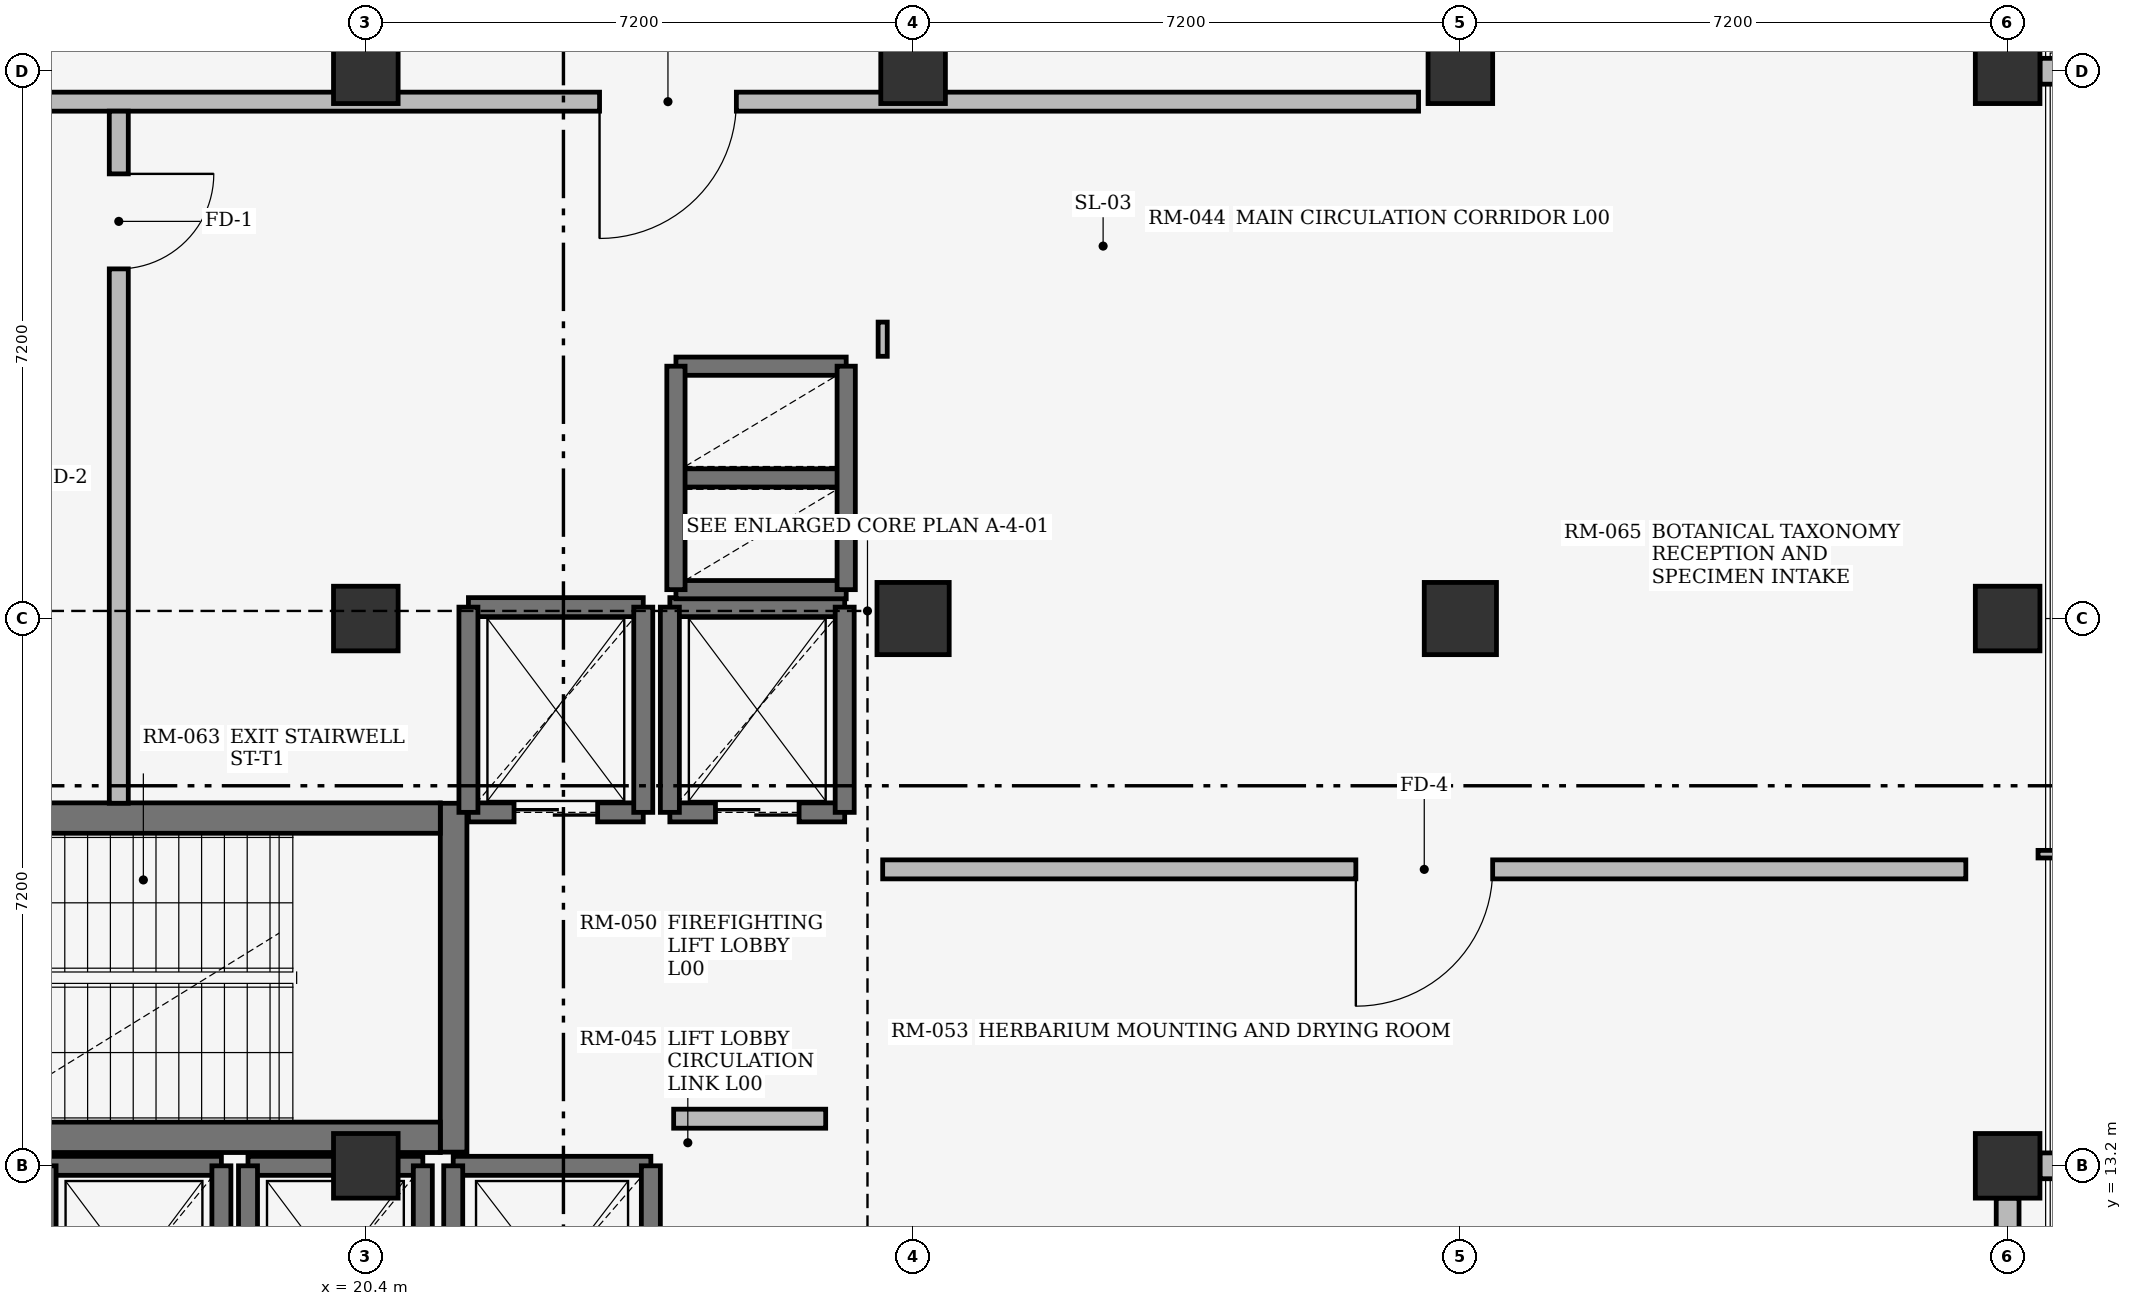
"""IFC4 building model, lengths in metres.
Left out: names, types, materials, properties, quantities, classifications, styles, units other than length and angle.
Written with IfcOpenShell. Run it as: python <this file> out.ifc"""

import sys

from ifc_helpers import new_model, si_unit, direction, frame, frame_2d, origin, origin_2d, place, context, subcontext, project, spatial, rectangle, extrude, element, fill, save


model = new_model("IFC4")
c1 = context("Model", 3, precision=1e-05, world=origin(), true_north=direction((0.0, 1.0)))
c2 = subcontext(c1, "Body", "Model", "MODEL_VIEW")
j1 = project(units=[si_unit("LENGTHUNIT", "METRE"), si_unit("PLANEANGLEUNIT", "RADIAN")], contexts=[c1])
p1 = place(None, origin())
s1 = spatial("IfcSite", under=j1, at=p1, CompositionType="ELEMENT")
p2 = place(p1, origin())
s2 = spatial("IfcBuilding", under=s1, at=p2, CompositionType="ELEMENT")
p3 = place(p2, origin())
s3 = spatial("IfcBuildingStorey", under=s2, at=p3, CompositionType="ELEMENT", Elevation=0.0)
for number, where, z_axis, x_axis in (
    (1, (20.4, 13.2, 0.0), (0.0, 0.0, 1.0), (1.0, 0.0, 0.0)),
    (2, (20.4, 20.4, 0.0), (0.0, 0.0, 1.0), (1.0, 0.0, 0.0)),
    (3, (20.4, 27.6, 0.0), (0.0, 0.0, 1.0), (1.0, 0.0, 0.0)),
):
    element("IfcColumn", number, at=place(p3, frame(where, z_axis=z_axis, x_axis=x_axis)), inside=s3, PredefinedType="COLUMN", context=c2, shape_type="SweptSolid", body=[
        extrude(rectangle(XDim=0.85, YDim=0.85, at=origin_2d()), origin(), (0.0, 0.0, 1.0), 4.48),
    ])
p4 = place(p3, frame((27.6, 20.4, 0.0), z_axis=(0.0, 0.0, 1.0), x_axis=(1.0, 0.0, 0.0)))
e4 = element("IfcColumn", 4, at=p4, inside=s3, PredefinedType="COLUMN", context=c2, shape_type="SweptSolid", body=[
    extrude(rectangle(XDim=0.95, YDim=0.95, at=origin_2d()), origin(), (0.0, 0.0, 1.0), 4.48),
])
p5 = place(p3, frame((27.6, 27.6, 0.0), z_axis=(0.0, 0.0, 1.0), x_axis=(1.0, 0.0, 0.0)))
e5 = element("IfcColumn", 5, at=p5, inside=s3, PredefinedType="COLUMN", context=c2, shape_type="SweptSolid", body=[
    extrude(rectangle(XDim=0.85, YDim=0.85, at=origin_2d()), origin(), (0.0, 0.0, 1.0), 4.48),
])
p6 = place(p3, frame((34.8, 20.4, 0.0), z_axis=(0.0, 0.0, 1.0), x_axis=(1.0, 0.0, 0.0)))
e6 = element("IfcColumn", 6, at=p6, inside=s3, PredefinedType="COLUMN", context=c2, shape_type="SweptSolid", body=[
    extrude(rectangle(XDim=0.95, YDim=0.95, at=origin_2d()), origin(), (0.0, 0.0, 1.0), 4.48),
])
for number, where, z_axis, x_axis in (
    (7, (34.8, 27.6, 0.0), (0.0, 0.0, 1.0), (1.0, 0.0, 0.0)),
    (8, (42.0, 13.2, 0.0), (0.0, 0.0, 1.0), (1.0, 0.0, 0.0)),
    (9, (42.0, 20.4, 0.0), (0.0, 0.0, 1.0), (1.0, 0.0, 0.0)),
    (10, (42.0, 27.6, 0.0), (0.0, 0.0, 1.0), (1.0, 0.0, 0.0)),
):
    element("IfcColumn", number, at=place(p3, frame(where, z_axis=z_axis, x_axis=x_axis)), inside=s3, PredefinedType="COLUMN", context=c2, shape_type="SweptSolid", body=[
        extrude(rectangle(XDim=0.85, YDim=0.85, at=origin_2d()), origin(), (0.0, 0.0, 1.0), 4.48),
    ])
p7 = place(p3, frame((42.425, 13.2, 0.0), z_axis=(0.0, 0.0, 1.0), x_axis=(1.0, 0.0, 0.0)))
e11 = element("IfcWall", 11, at=p7, inside=s3, PredefinedType="STANDARD", context=c2, shape_type="SweptSolid", body=[
    extrude(rectangle(XDim=6.4, YDim=0.34, at=frame_2d((3.2, 0.0))), origin(), (0.0, 0.0, 1.0), 3.97),
])
p8 = place(p7, frame((2.1, 0.0, 0.0)))
e12 = element("IfcOpeningElement", 12, at=p8, cuts=e11, PredefinedType="OPENING", context=c2, shape_type="SweptSolid", body=[
    extrude(rectangle(XDim=2.2, YDim=2.4, at=frame_2d((1.1, 1.2))), frame((0.0, 0.18, 0.0), z_axis=(0.0, -1.0, 0.0), x_axis=(1.0, 0.0, 0.0)), (0.0, 0.0, 1.0), 0.36),
])
p9 = place(p3, frame((42.425, 27.6, 0.0), z_axis=(0.0, 0.0, 1.0), x_axis=(1.0, 0.0, 0.0)))
e13 = element("IfcWall", 13, at=p9, inside=s3, PredefinedType="STANDARD", context=c2, shape_type="SweptSolid", body=[
    extrude(rectangle(XDim=6.4, YDim=0.34, at=frame_2d((3.2, 0.0))), origin(), (0.0, 0.0, 1.0), 3.97),
])
p10 = place(p9, frame((2.4, 0.0, 0.75)))
e14 = element("IfcOpeningElement", 14, at=p10, cuts=e13, PredefinedType="OPENING", context=c2, shape_type="SweptSolid", body=[
    extrude(rectangle(XDim=1.6, YDim=1.35, at=frame_2d((0.8, 0.675))), frame((0.0, 0.18, 0.0), z_axis=(0.0, -1.0, 0.0), x_axis=(1.0, 0.0, 0.0)), (0.0, 0.0, 1.0), 0.36),
])
p11 = place(p3, frame((42.0, 6.425, 0.0), z_axis=(0.0, 0.0, 1.0), x_axis=(0.0, 1.0, 0.0)))
e15 = element("IfcWall", 15, at=p11, inside=s3, PredefinedType="STANDARD", context=c2, shape_type="SweptSolid", body=[
    extrude(rectangle(XDim=6.35, YDim=0.3, at=frame_2d((3.175, 0.0))), origin(), (0.0, 0.0, 1.0), 3.66),
])
p12 = place(p11, frame((2.6, 0.0, 0.75)))
e16 = element("IfcOpeningElement", 16, at=p12, cuts=e15, PredefinedType="OPENING", context=c2, shape_type="SweptSolid", body=[
    extrude(rectangle(XDim=1.15, YDim=1.5, at=frame_2d((0.575, 0.75))), frame((0.0, 0.16, 0.0), z_axis=(0.0, -1.0, 0.0), x_axis=(1.0, 0.0, 0.0)), (0.0, 0.0, 1.0), 0.32),
])
p13 = place(p3, frame((21.555, 13.38, 0.0), z_axis=(0.0, 0.0, 1.0), x_axis=(0.0, 1.0, 0.0)))
e17 = element("IfcWall", 17, at=p13, inside=s3, PredefinedType="SHEAR", context=c2, shape_type="SweptSolid", body=[
    extrude(rectangle(XDim=4.59, YDim=0.35, at=frame_2d((2.295, 0.0))), origin(), (0.0, 0.0, 1.0), 4.48),
])
for number, where, z_axis, x_axis in (
    (18, (13.4, 13.575, 0.0), (0.0, 0.0, 1.0), (1.0, 0.0, 0.0)),
    (19, (13.4, 17.775, 0.0), (0.0, 0.0, 1.0), (1.0, 0.0, 0.0)),
):
    element("IfcWall", number, at=place(p3, frame(where, z_axis=z_axis, x_axis=x_axis)), inside=s3, PredefinedType="SHEAR", context=c2, shape_type="SweptSolid", body=[
        extrude(rectangle(XDim=7.98, YDim=0.4, at=frame_2d((3.99, 0.0))), origin(), (0.0, 0.0, 1.0), 4.48),
    ])
p14 = place(p3, frame((21.75, 17.85, 0.0), z_axis=(0.0, 0.0, 1.0), x_axis=(1.0, 0.0, 0.0)))
e20 = element("IfcWall", 20, at=p14, inside=s3, PredefinedType="SHEAR", context=c2, shape_type="SweptSolid", body=[
    extrude(rectangle(XDim=2.3, YDim=0.25, at=frame_2d((1.15, 0.0))), origin(), (0.0, 0.0, 1.0), 4.48),
])
p15 = place(p14, frame((0.6, 0.0, 0.0)))
e21 = element("IfcOpeningElement", 21, at=p15, cuts=e20, PredefinedType="OPENING", context=c2, shape_type="SweptSolid", body=[
    extrude(rectangle(XDim=1.1, YDim=2.2, at=frame_2d((0.55, 1.1))), frame((0.0, 0.135, 0.0), z_axis=(0.0, -1.0, 0.0), x_axis=(1.0, 0.0, 0.0)), (0.0, 0.0, 1.0), 0.27),
])
p16 = place(p3, frame((21.75, 20.55, 0.0), z_axis=(0.0, 0.0, 1.0), x_axis=(1.0, 0.0, 0.0)))
e22 = element("IfcWall", 22, at=p16, inside=s3, PredefinedType="SHEAR", context=c2, shape_type="SweptSolid", body=[
    extrude(rectangle(XDim=2.3, YDim=0.25, at=frame_2d((1.15, 0.0))), origin(), (0.0, 0.0, 1.0), 4.48),
])
for number, where, z_axis, x_axis in (
    (23, (21.75, 17.85, 0.0), (0.0, 0.0, 1.0), (0.0, 1.0, 0.0)),
    (24, (24.05, 17.85, 0.0), (0.0, 0.0, 1.0), (0.0, 1.0, 0.0)),
):
    element("IfcWall", number, at=place(p3, frame(where, z_axis=z_axis, x_axis=x_axis)), inside=s3, PredefinedType="SHEAR", context=c2, shape_type="SweptSolid", body=[
        extrude(rectangle(XDim=2.7, YDim=0.25, at=frame_2d((1.35, 0.0))), origin(), (0.0, 0.0, 1.0), 4.48),
    ])
p17 = place(p3, frame((24.4, 17.85, 0.0), z_axis=(0.0, 0.0, 1.0), x_axis=(1.0, 0.0, 0.0)))
e25 = element("IfcWall", 25, at=p17, inside=s3, PredefinedType="SHEAR", context=c2, shape_type="SweptSolid", body=[
    extrude(rectangle(XDim=2.3, YDim=0.25, at=frame_2d((1.15, 0.0))), origin(), (0.0, 0.0, 1.0), 4.48),
])
p18 = place(p17, frame((0.6, 0.0, 0.0)))
e26 = element("IfcOpeningElement", 26, at=p18, cuts=e25, PredefinedType="OPENING", context=c2, shape_type="SweptSolid", body=[
    extrude(rectangle(XDim=1.1, YDim=2.2, at=frame_2d((0.55, 1.1))), frame((0.0, 0.135, 0.0), z_axis=(0.0, -1.0, 0.0), x_axis=(1.0, 0.0, 0.0)), (0.0, 0.0, 1.0), 0.27),
])
p19 = place(p3, frame((24.4, 20.55, 0.0), z_axis=(0.0, 0.0, 1.0), x_axis=(1.0, 0.0, 0.0)))
e27 = element("IfcWall", 27, at=p19, inside=s3, PredefinedType="SHEAR", context=c2, shape_type="SweptSolid", body=[
    extrude(rectangle(XDim=2.3, YDim=0.25, at=frame_2d((1.15, 0.0))), origin(), (0.0, 0.0, 1.0), 4.48),
])
for number, where, z_axis, x_axis in (
    (28, (24.4, 17.85, 0.0), (0.0, 0.0, 1.0), (0.0, 1.0, 0.0)),
    (29, (26.7, 17.85, 0.0), (0.0, 0.0, 1.0), (0.0, 1.0, 0.0)),
):
    element("IfcWall", number, at=place(p3, frame(where, z_axis=z_axis, x_axis=x_axis)), inside=s3, PredefinedType="SHEAR", context=c2, shape_type="SweptSolid", body=[
        extrude(rectangle(XDim=2.7, YDim=0.25, at=frame_2d((1.35, 0.0))), origin(), (0.0, 0.0, 1.0), 4.48),
    ])
p20 = place(p3, frame((16.2, 13.2, 0.0), z_axis=(0.0, 0.0, 1.0), x_axis=(1.0, 0.0, 0.0)))
e30 = element("IfcWall", 30, at=p20, inside=s3, PredefinedType="SHEAR", context=c2, shape_type="SweptSolid", body=[
    extrude(rectangle(XDim=2.3, YDim=0.25, at=frame_2d((1.15, 0.0))), origin(), (0.0, 0.0, 1.0), 4.48),
])
for number, where, z_axis, x_axis in (
    (31, (16.2, 10.4, 0.0), (0.0, 0.0, 1.0), (0.0, 1.0, 0.0)),
    (32, (18.5, 10.4, 0.0), (0.0, 0.0, 1.0), (0.0, 1.0, 0.0)),
):
    element("IfcWall", number, at=place(p3, frame(where, z_axis=z_axis, x_axis=x_axis)), inside=s3, PredefinedType="SHEAR", context=c2, shape_type="SweptSolid", body=[
        extrude(rectangle(XDim=2.8, YDim=0.25, at=frame_2d((1.4, 0.0))), origin(), (0.0, 0.0, 1.0), 4.48),
    ])
p21 = place(p3, frame((18.85, 13.2, 0.0), z_axis=(0.0, 0.0, 1.0), x_axis=(1.0, 0.0, 0.0)))
e33 = element("IfcWall", 33, at=p21, inside=s3, PredefinedType="SHEAR", context=c2, shape_type="SweptSolid", body=[
    extrude(rectangle(XDim=2.3, YDim=0.25, at=frame_2d((1.15, 0.0))), origin(), (0.0, 0.0, 1.0), 4.48),
])
for number, where, z_axis, x_axis in (
    (34, (18.85, 10.4, 0.0), (0.0, 0.0, 1.0), (0.0, 1.0, 0.0)),
    (35, (21.15, 10.4, 0.0), (0.0, 0.0, 1.0), (0.0, 1.0, 0.0)),
):
    element("IfcWall", number, at=place(p3, frame(where, z_axis=z_axis, x_axis=x_axis)), inside=s3, PredefinedType="SHEAR", context=c2, shape_type="SweptSolid", body=[
        extrude(rectangle(XDim=2.8, YDim=0.25, at=frame_2d((1.4, 0.0))), origin(), (0.0, 0.0, 1.0), 4.48),
    ])
p22 = place(p3, frame((21.55, 13.2, 0.0), z_axis=(0.0, 0.0, 1.0), x_axis=(1.0, 0.0, 0.0)))
e36 = element("IfcWall", 36, at=p22, inside=s3, PredefinedType="SHEAR", context=c2, shape_type="SweptSolid", body=[
    extrude(rectangle(XDim=2.6, YDim=0.25, at=frame_2d((1.3, 0.0))), origin(), (0.0, 0.0, 1.0), 4.48),
])
for number, where, z_axis, x_axis in (
    (37, (21.55, 10.2, 0.0), (0.0, 0.0, 1.0), (0.0, 1.0, 0.0)),
    (38, (24.15, 10.2, 0.0), (0.0, 0.0, 1.0), (0.0, 1.0, 0.0)),
):
    element("IfcWall", number, at=place(p3, frame(where, z_axis=z_axis, x_axis=x_axis)), inside=s3, PredefinedType="SHEAR", context=c2, shape_type="SweptSolid", body=[
        extrude(rectangle(XDim=3.0, YDim=0.25, at=frame_2d((1.5, 0.0))), origin(), (0.0, 0.0, 1.0), 4.48),
    ])
for number, where, z_axis, x_axis in (
    (39, (24.48, 20.78, 0.0), (0.0, 0.0, 1.0), (1.0, 0.0, 0.0)),
    (40, (24.48, 22.25, 0.0), (0.0, 0.0, 1.0), (1.0, 0.0, 0.0)),
    (41, (24.48, 23.72, 0.0), (0.0, 0.0, 1.0), (1.0, 0.0, 0.0)),
):
    element("IfcWall", number, at=place(p3, frame(where, z_axis=z_axis, x_axis=x_axis)), inside=s3, PredefinedType="SHEAR", context=c2, shape_type="SweptSolid", body=[
        extrude(rectangle(XDim=2.24, YDim=0.24, at=frame_2d((1.12, 0.0))), origin(), (0.0, 0.0, 1.0), 4.48),
    ])
for number, where, z_axis, x_axis in (
    (42, (24.48, 20.78, 0.0), (0.0, 0.0, 1.0), (0.0, 1.0, 0.0)),
    (43, (26.72, 20.78, 0.0), (0.0, 0.0, 1.0), (0.0, 1.0, 0.0)),
):
    element("IfcWall", number, at=place(p3, frame(where, z_axis=z_axis, x_axis=x_axis)), inside=s3, PredefinedType="SHEAR", context=c2, shape_type="SweptSolid", body=[
        extrude(rectangle(XDim=2.94, YDim=0.24, at=frame_2d((1.47, 0.0))), origin(), (0.0, 0.0, 1.0), 4.48),
    ])
p23 = place(p3, frame((24.45, 13.82, 0.0), z_axis=(0.0, 0.0, 1.0), x_axis=(1.0, 0.0, 0.0)))
e44 = element("IfcWall", 44, at=p23, inside=s3, PredefinedType="SOLIDWALL", context=c2, shape_type="SweptSolid", body=[
    extrude(rectangle(XDim=2.0, YDim=0.25, at=frame_2d((1.0, 0.0))), origin(), (0.0, 0.0, 1.0), 4.46),
])
p24 = place(p3, frame((27.2, 24.3, 0.0), z_axis=(0.0, 0.0, 1.0), x_axis=(0.0, -1.0, 0.0)))
e45 = element("IfcWall", 45, at=p24, inside=s3, PredefinedType="PARTITIONING", context=c2, shape_type="SweptSolid", body=[
    extrude(rectangle(XDim=0.45, YDim=0.12, at=frame_2d((0.225, 0.0))), origin(), (0.0, 0.0, 1.0), 3.46),
])
p25 = place(p3, frame((14.5, 27.2, 0.0), z_axis=(0.0, 0.0, 1.0), x_axis=(1.0, 0.0, 0.0)))
e46 = element("IfcWall", 46, at=p25, inside=s3, PredefinedType="SOLIDWALL", context=c2, shape_type="SweptSolid", body=[
    extrude(rectangle(XDim=19.75, YDim=0.25, at=frame_2d((9.875, 0.0))), origin(), (0.0, 0.0, 1.0), 4.46),
])
p26 = place(p25, frame((8.975, 0.0, 0.0)))
e47 = element("IfcOpeningElement", 47, at=p26, cuts=e46, PredefinedType="OPENING", context=c2, shape_type="SweptSolid", body=[
    extrude(rectangle(XDim=1.8, YDim=2.25, at=frame_2d((0.9, 1.125))), frame((0.0, 0.135, 0.0), z_axis=(0.0, -1.0, 0.0), x_axis=(1.0, 0.0, 0.0)), (0.0, 0.0, 1.0), 0.27),
])
p27 = place(p3, frame((42.4, 17.3, 0.0), z_axis=(0.0, 0.0, 1.0), x_axis=(1.0, 0.0, 0.0)))
e48 = element("IfcWall", 48, at=p27, inside=s3, PredefinedType="PARTITIONING", context=c2, shape_type="SweptSolid", body=[
    extrude(rectangle(XDim=6.6, YDim=0.1, at=frame_2d((3.3, 0.0))), origin(), (0.0, 0.0, 1.0), 4.46),
])
p28 = place(p27, frame((2.825, 0.0, 0.0)))
e49 = element("IfcOpeningElement", 49, at=p28, cuts=e48, PredefinedType="OPENING", context=c2, shape_type="SweptSolid", body=[
    extrude(rectangle(XDim=0.95, YDim=2.15, at=frame_2d((0.475, 1.075))), frame((0.0, 0.06, 0.0), z_axis=(0.0, -1.0, 0.0), x_axis=(1.0, 0.0, 0.0)), (0.0, 0.0, 1.0), 0.12),
])
p29 = place(p3, frame((27.2, 17.1, 0.0), z_axis=(0.0, 0.0, 1.0), x_axis=(1.0, 0.0, 0.0)))
e50 = element("IfcWall", 50, at=p29, inside=s3, PredefinedType="SOLIDWALL", context=c2, shape_type="SweptSolid", body=[
    extrude(rectangle(XDim=14.25, YDim=0.25, at=frame_2d((7.125, 0.0))), origin(), (0.0, 0.0, 1.0), 4.46),
])
p30 = place(p29, frame((6.225, 0.0, 0.0)))
e51 = element("IfcOpeningElement", 51, at=p30, cuts=e50, PredefinedType="OPENING", context=c2, shape_type="SweptSolid", body=[
    extrude(rectangle(XDim=1.8, YDim=2.25, at=frame_2d((0.9, 1.125))), frame((0.0, 0.135, 0.0), z_axis=(0.0, -1.0, 0.0), x_axis=(1.0, 0.0, 0.0)), (0.0, 0.0, 1.0), 0.27),
])
p31 = place(p3, frame((17.15, 17.97, 0.0), z_axis=(0.0, 0.0, 1.0), x_axis=(0.0, 1.0, 0.0)))
e52 = element("IfcWall", 52, at=p31, inside=s3, PredefinedType="SOLIDWALL", context=c2, shape_type="SweptSolid", body=[
    extrude(rectangle(XDim=9.105, YDim=0.25, at=frame_2d((4.552, 0.0))), origin(), (0.0, 0.0, 1.0), 4.46),
])
p32 = place(p31, frame((7.03, 0.0, 0.0)))
e53 = element("IfcOpeningElement", 53, at=p32, cuts=e52, PredefinedType="OPENING", context=c2, shape_type="SweptSolid", body=[
    extrude(rectangle(XDim=1.25, YDim=2.2, at=frame_2d((0.625, 1.1))), frame((0.0, 0.135, 0.0), z_axis=(0.0, -1.0, 0.0), x_axis=(1.0, 0.0, 0.0)), (0.0, 0.0, 1.0), 0.27),
])
p33 = place(p15, origin())
e54 = element("IfcDoor", 54, at=p33, inside=s3, OperationType="DOUBLE_DOOR_SLIDING", PredefinedType="DOOR", context=c2, shape_type="SweptSolid", body=[
    extrude(rectangle(XDim=1.1, YDim=2.2, at=frame_2d((0.55, 1.1))), frame((0.0, 0.025, 0.0), z_axis=(0.0, -1.0, 0.0), x_axis=(1.0, 0.0, 0.0)), (0.0, 0.0, 1.0), 0.05),
])
fill(e21, e54)
p34 = place(p18, origin())
e55 = element("IfcDoor", 55, at=p34, inside=s3, OperationType="DOUBLE_DOOR_SLIDING", PredefinedType="DOOR", context=c2, shape_type="SweptSolid", body=[
    extrude(rectangle(XDim=1.1, YDim=2.2, at=frame_2d((0.55, 1.1))), frame((0.0, 0.025, 0.0), z_axis=(0.0, -1.0, 0.0), x_axis=(1.0, 0.0, 0.0)), (0.0, 0.0, 1.0), 0.05),
])
fill(e26, e55)
p35 = place(p26, frame((1.8, 0.0, 0.0), z_axis=(0.0, 0.0, 1.0), x_axis=(-1.0, 0.0, 0.0)))
e56 = element("IfcDoor", 56, at=p35, inside=s3, OperationType="DOUBLE_DOOR_SINGLE_SWING", PredefinedType="DOOR", context=c2, shape_type="SweptSolid", body=[
    extrude(rectangle(XDim=1.8, YDim=2.25, at=frame_2d((0.9, 1.125))), frame((0.0, 0.025, 0.0), z_axis=(0.0, -1.0, 0.0), x_axis=(1.0, 0.0, 0.0)), (0.0, 0.0, 1.0), 0.05),
])
fill(e47, e56)
p36 = place(p30, frame((1.8, 0.0, 0.0), z_axis=(0.0, 0.0, 1.0), x_axis=(-1.0, 0.0, 0.0)))
e57 = element("IfcDoor", 57, at=p36, inside=s3, OperationType="DOUBLE_DOOR_SINGLE_SWING", PredefinedType="DOOR", context=c2, shape_type="SweptSolid", body=[
    extrude(rectangle(XDim=1.8, YDim=2.25, at=frame_2d((0.9, 1.125))), frame((0.0, 0.025, 0.0), z_axis=(0.0, -1.0, 0.0), x_axis=(1.0, 0.0, 0.0)), (0.0, 0.0, 1.0), 0.05),
])
fill(e51, e57)
p37 = place(p32, origin())
e58 = element("IfcDoor", 58, at=p37, inside=s3, OperationType="SINGLE_SWING_RIGHT", PredefinedType="DOOR", context=c2, shape_type="SweptSolid", body=[
    extrude(rectangle(XDim=1.25, YDim=2.2, at=frame_2d((0.625, 1.1))), frame((0.0, 0.025, 0.0), z_axis=(0.0, -1.0, 0.0), x_axis=(1.0, 0.0, 0.0)), (0.0, 0.0, 1.0), 0.05),
])
fill(e53, e58)
save(model, sys.argv[1])
